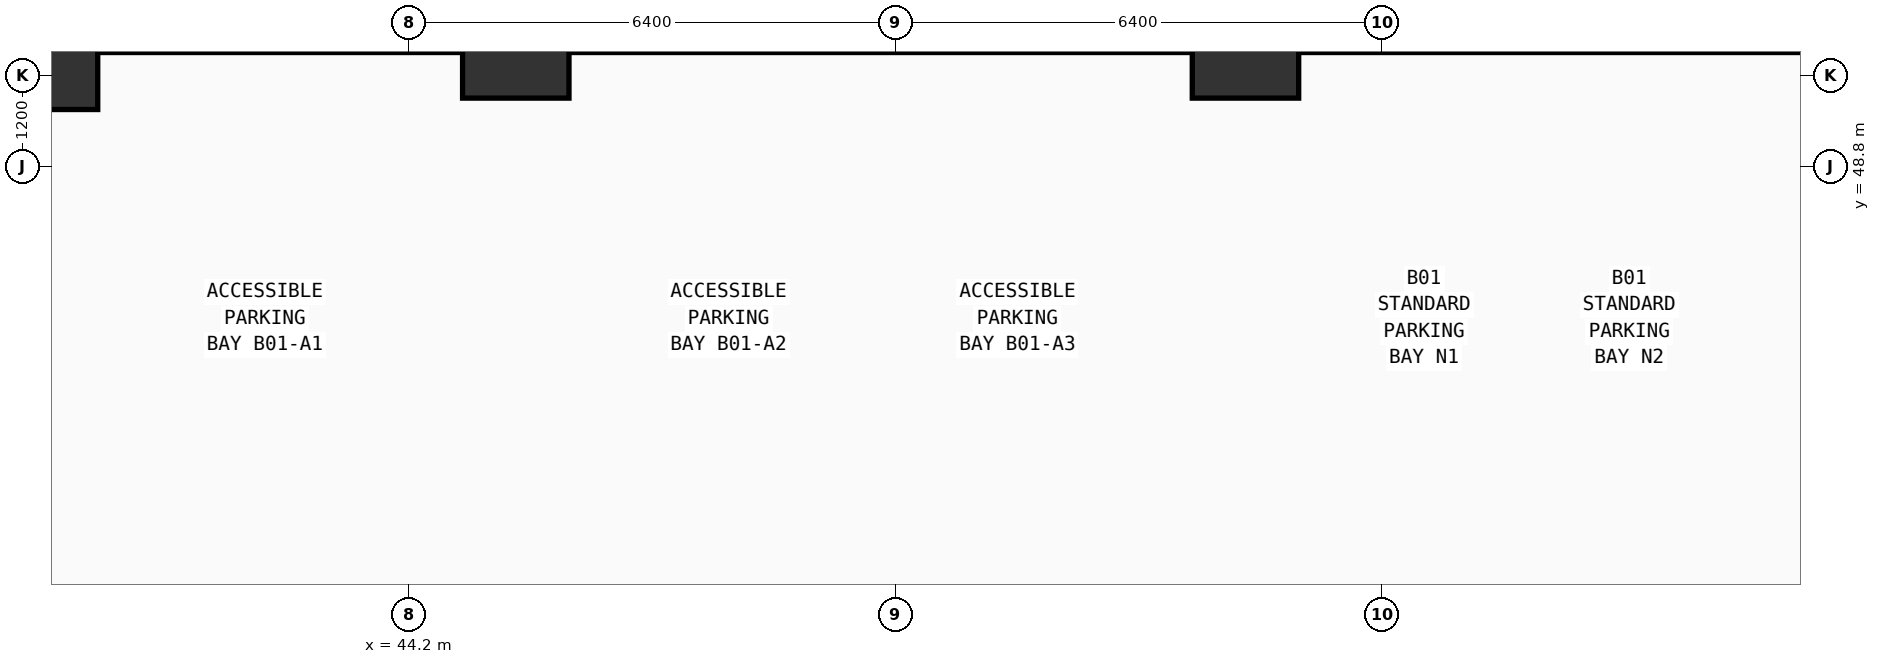
"""IFC4 building model, lengths in metres.
Left out: names, types, materials, properties, quantities, classifications, styles, units other than length and angle.
Written with IfcOpenShell. Run it as: python <this file> out.ifc"""

import sys

from ifc_helpers import new_model, si_unit, direction, frame, origin, origin_2d, place, context, subcontext, project, spatial, rectangle, extrude, element, save


model = new_model("IFC4")
c1 = context("Model", 3, precision=1e-05, world=origin(), true_north=direction((0.0, 1.0)))
c2 = subcontext(c1, "Body", "Model", "MODEL_VIEW")
j1 = project(units=[si_unit("LENGTHUNIT", "METRE"), si_unit("PLANEANGLEUNIT", "RADIAN")], contexts=[c1])
p1 = place(None, origin())
s1 = spatial("IfcSite", under=j1, at=p1, CompositionType="ELEMENT")
p2 = place(p1, origin())
s2 = spatial("IfcBuilding", under=s1, at=p2, CompositionType="ELEMENT")
p3 = place(p2, frame((0.0, 0.0, -4.2)))
s3 = spatial("IfcBuildingStorey", under=s2, at=p3, CompositionType="ELEMENT", Elevation=-4.2)
for number, where, z_axis, x_axis in (
    (1, (39.4, 50.25, 0.0), (0.0, 0.0, 1.0), (1.0, 0.0, 0.0)),
    (2, (45.6, 50.4, 0.0), (0.0, 0.0, 1.0), (1.0, 0.0, 0.0)),
    (3, (55.2, 50.4, 0.0), (0.0, 0.0, 1.0), (1.0, 0.0, 0.0)),
):
    element("IfcColumn", number, at=place(p3, frame(where, z_axis=z_axis, x_axis=x_axis)), inside=s3, PredefinedType="COLUMN", context=c2, shape_type="SweptSolid", body=[
        extrude(rectangle(XDim=1.4, YDim=1.4, at=origin_2d()), origin(), (0.0, 0.0, 1.0), 4.02),
    ])
save(model, sys.argv[1])
